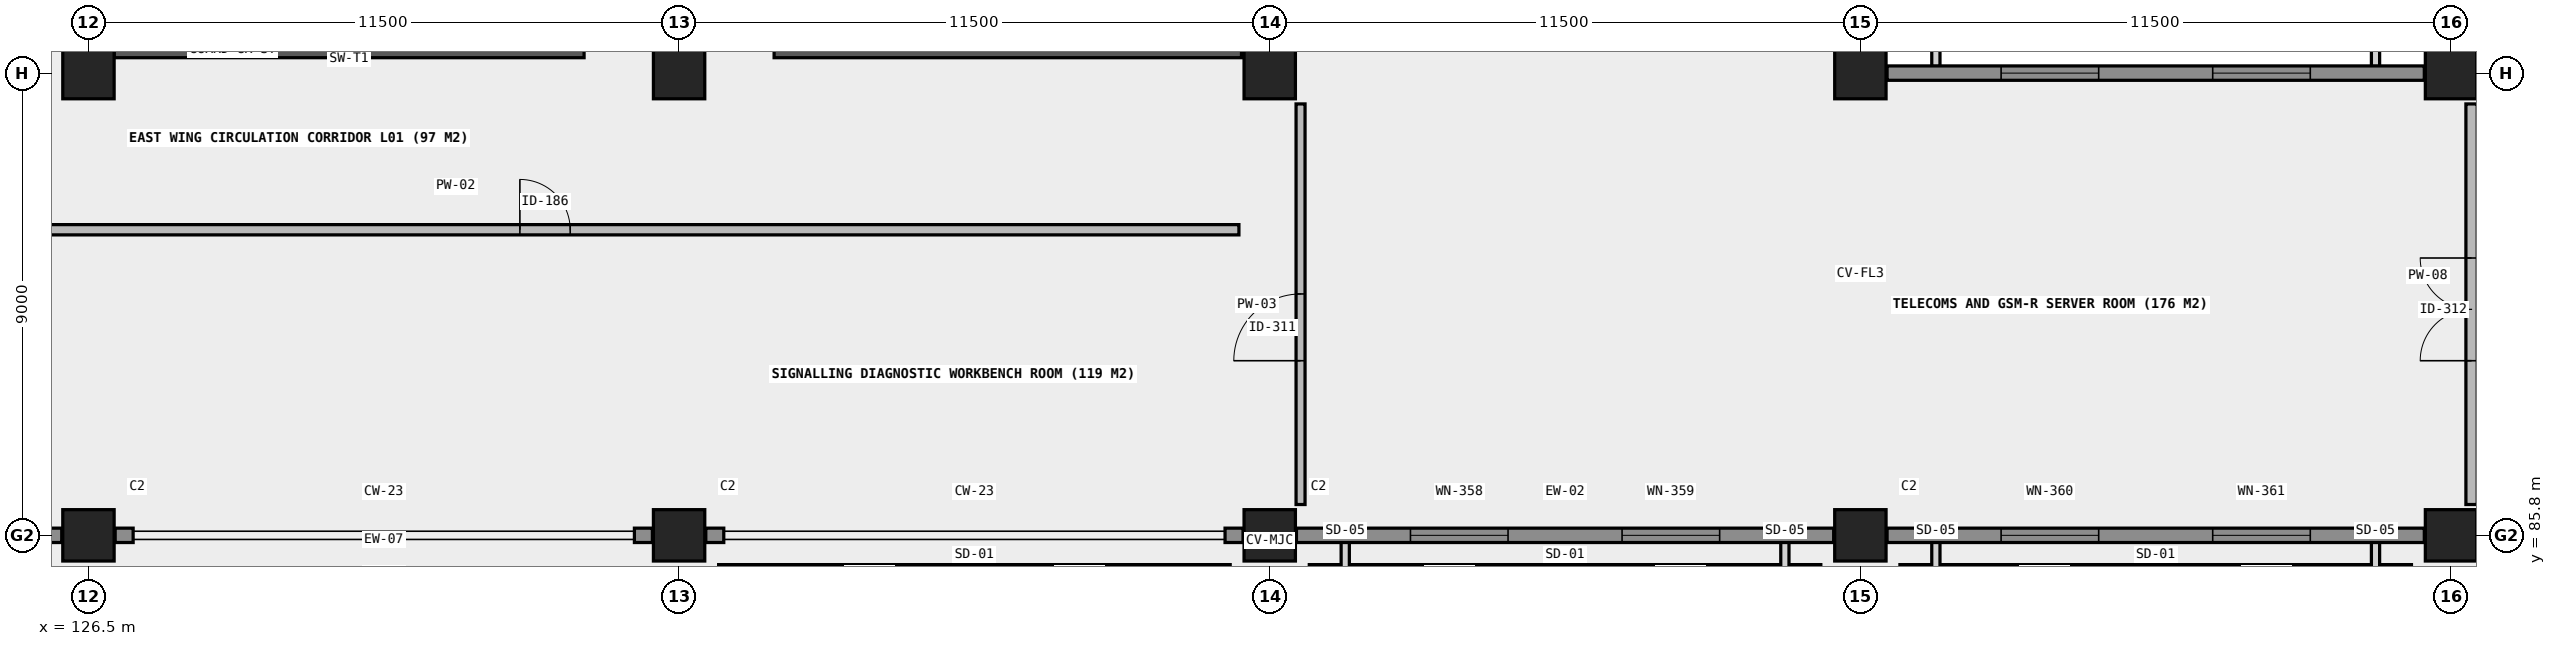
"""IFC4 building model, lengths in metres.
Left out: names, types, materials, properties, quantities, classifications, styles, units other than length and angle.
Written with IfcOpenShell. Run it as: python <this file> out.ifc"""

import sys

from ifc_helpers import new_model, si_unit, direction, frame, frame_2d, origin, origin_2d, place, context, subcontext, project, spatial, rectangle, extrude, element, fill, save


model = new_model("IFC4")
c1 = context("Model", 3, precision=1e-05, world=origin(), true_north=direction((0.0, 1.0)))
c2 = subcontext(c1, "Body", "Model", "MODEL_VIEW")
j1 = project(units=[si_unit("LENGTHUNIT", "METRE"), si_unit("PLANEANGLEUNIT", "RADIAN")], contexts=[c1])
p1 = place(None, origin())
s1 = spatial("IfcSite", under=j1, at=p1, CompositionType="ELEMENT")
p2 = place(p1, origin())
s2 = spatial("IfcBuilding", under=s1, at=p2, CompositionType="ELEMENT")
p3 = place(p2, frame((0.0, 0.0, 4.2)))
s3 = spatial("IfcBuildingStorey", under=s2, at=p3, CompositionType="ELEMENT", Elevation=4.2)
for number, where, z_axis, x_axis in (
    (1, (126.5, 85.8, 0.0), (0.0, 0.0, 1.0), (1.0, 0.0, 0.0)),
    (2, (126.5, 94.8, 0.0), (0.0, 0.0, 1.0), (1.0, 0.0, 0.0)),
    (3, (138.0, 85.8, 0.0), (0.0, 0.0, 1.0), (1.0, 0.0, 0.0)),
    (4, (138.0, 94.8, 0.0), (0.0, 0.0, 1.0), (1.0, 0.0, 0.0)),
    (5, (149.5, 85.8, 0.0), (0.0, 0.0, 1.0), (1.0, 0.0, 0.0)),
    (6, (149.5, 94.8, 0.0), (0.0, 0.0, 1.0), (1.0, 0.0, 0.0)),
    (7, (161.0, 85.8, 0.0), (0.0, 0.0, 1.0), (1.0, 0.0, 0.0)),
    (8, (161.0, 94.8, 0.0), (0.0, 0.0, 1.0), (1.0, 0.0, 0.0)),
    (9, (172.5, 85.8, 0.0), (0.0, 0.0, 1.0), (1.0, 0.0, 0.0)),
    (10, (172.5, 94.8, 0.0), (0.0, 0.0, 1.0), (1.0, 0.0, 0.0)),
):
    element("IfcColumn", number, at=place(p3, frame(where, z_axis=z_axis, x_axis=x_axis)), inside=s3, PredefinedType="COLUMN", context=c2, shape_type="SweptSolid", body=[
        extrude(rectangle(XDim=1.0, YDim=1.0, at=origin_2d()), origin(), (0.0, 0.0, 1.0), 4.2),
    ])
p4 = place(p3, frame((127.0, 95.325, 0.0), z_axis=(0.0, 0.0, 1.0), x_axis=(1.0, 0.0, 0.0)))
e11 = element("IfcWall", 11, at=p4, inside=s3, PredefinedType="SHEAR", context=c2, shape_type="SweptSolid", body=[
    extrude(rectangle(XDim=9.15, YDim=0.45, at=frame_2d((4.575, 0.0))), origin(), (0.0, 0.0, 1.0), 4.2),
])
p5 = place(p3, frame((139.85, 95.325, 0.0), z_axis=(0.0, 0.0, 1.0), x_axis=(1.0, 0.0, 0.0)))
e12 = element("IfcWall", 12, at=p5, inside=s3, PredefinedType="SHEAR", context=c2, shape_type="SweptSolid", body=[
    extrude(rectangle(XDim=9.1, YDim=0.45, at=frame_2d((4.55, 0.0))), origin(), (0.0, 0.0, 1.0), 4.2),
])
p6 = place(p3, frame((115.52, 85.8, 0.0), z_axis=(0.0, 0.0, 1.0), x_axis=(1.0, 0.0, 0.0)))
e13 = element("IfcWall", 13, at=p6, inside=s3, PredefinedType="SOLIDWALL", context=c2, shape_type="SweptSolid", body=[
    extrude(rectangle(XDim=10.46, YDim=0.28, at=frame_2d((5.23, 0.0))), origin(), (0.0, 0.0, 1.0), 3.15),
])
p7 = place(p6, frame((2.22, 0.0, 1.25)))
e14 = element("IfcOpeningElement", 14, at=p7, cuts=e13, PredefinedType="OPENING", context=c2, shape_type="SweptSolid", body=[
    extrude(rectangle(XDim=1.9, YDim=1.25, at=frame_2d((0.95, 0.625))), frame((0.0, 0.15, 0.0), z_axis=(0.0, -1.0, 0.0), x_axis=(1.0, 0.0, 0.0)), (0.0, 0.0, 1.0), 0.3),
])
p8 = place(p6, frame((6.34, 0.0, 1.25)))
e15 = element("IfcOpeningElement", 15, at=p8, cuts=e13, PredefinedType="OPENING", context=c2, shape_type="SweptSolid", body=[
    extrude(rectangle(XDim=1.9, YDim=1.25, at=frame_2d((0.95, 0.625))), frame((0.0, 0.15, 0.0), z_axis=(0.0, -1.0, 0.0), x_axis=(1.0, 0.0, 0.0)), (0.0, 0.0, 1.0), 0.3),
])
for number, where, z_axis, x_axis in (
    (16, (127.02, 85.8, 0.0), (0.0, 0.0, 1.0), (1.0, 0.0, 0.0)),
    (17, (137.13, 85.8, 0.0), (0.0, 0.0, 1.0), (1.0, 0.0, 0.0)),
    (18, (138.52, 85.8, 0.0), (0.0, 0.0, 1.0), (1.0, 0.0, 0.0)),
    (19, (148.63, 85.8, 0.0), (0.0, 0.0, 1.0), (1.0, 0.0, 0.0)),
):
    element("IfcWall", number, at=place(p3, frame(where, z_axis=z_axis, x_axis=x_axis)), inside=s3, PredefinedType="SOLIDWALL", context=c2, shape_type="SweptSolid", body=[
        extrude(rectangle(XDim=0.35, YDim=0.28, at=frame_2d((0.175, 0.0))), origin(), (0.0, 0.0, 1.0), 3.93),
    ])
p9 = place(p3, frame((150.02, 85.8, 0.0), z_axis=(0.0, 0.0, 1.0), x_axis=(1.0, 0.0, 0.0)))
e20 = element("IfcWall", 20, at=p9, inside=s3, PredefinedType="SOLIDWALL", context=c2, shape_type="SweptSolid", body=[
    extrude(rectangle(XDim=10.46, YDim=0.28, at=frame_2d((5.23, 0.0))), origin(), (0.0, 0.0, 1.0), 3.15),
])
p10 = place(p9, frame((2.22, 0.0, 1.25)))
e21 = element("IfcOpeningElement", 21, at=p10, cuts=e20, PredefinedType="OPENING", context=c2, shape_type="SweptSolid", body=[
    extrude(rectangle(XDim=1.9, YDim=1.25, at=frame_2d((0.95, 0.625))), frame((0.0, 0.15, 0.0), z_axis=(0.0, -1.0, 0.0), x_axis=(1.0, 0.0, 0.0)), (0.0, 0.0, 1.0), 0.3),
])
p11 = place(p9, frame((6.34, 0.0, 1.25)))
e22 = element("IfcOpeningElement", 22, at=p11, cuts=e20, PredefinedType="OPENING", context=c2, shape_type="SweptSolid", body=[
    extrude(rectangle(XDim=1.9, YDim=1.25, at=frame_2d((0.95, 0.625))), frame((0.0, 0.15, 0.0), z_axis=(0.0, -1.0, 0.0), x_axis=(1.0, 0.0, 0.0)), (0.0, 0.0, 1.0), 0.3),
])
p12 = place(p3, frame((161.52, 85.8, 0.0), z_axis=(0.0, 0.0, 1.0), x_axis=(1.0, 0.0, 0.0)))
e23 = element("IfcWall", 23, at=p12, inside=s3, PredefinedType="SOLIDWALL", context=c2, shape_type="SweptSolid", body=[
    extrude(rectangle(XDim=10.46, YDim=0.28, at=frame_2d((5.23, 0.0))), origin(), (0.0, 0.0, 1.0), 3.15),
])
p13 = place(p12, frame((2.22, 0.0, 1.25)))
e24 = element("IfcOpeningElement", 24, at=p13, cuts=e23, PredefinedType="OPENING", context=c2, shape_type="SweptSolid", body=[
    extrude(rectangle(XDim=1.9, YDim=1.25, at=frame_2d((0.95, 0.625))), frame((0.0, 0.15, 0.0), z_axis=(0.0, -1.0, 0.0), x_axis=(1.0, 0.0, 0.0)), (0.0, 0.0, 1.0), 0.3),
])
p14 = place(p12, frame((6.34, 0.0, 1.25)))
e25 = element("IfcOpeningElement", 25, at=p14, cuts=e23, PredefinedType="OPENING", context=c2, shape_type="SweptSolid", body=[
    extrude(rectangle(XDim=1.9, YDim=1.25, at=frame_2d((0.95, 0.625))), frame((0.0, 0.15, 0.0), z_axis=(0.0, -1.0, 0.0), x_axis=(1.0, 0.0, 0.0)), (0.0, 0.0, 1.0), 0.3),
])
p15 = place(p3, frame((161.52, 94.8, 0.0), z_axis=(0.0, 0.0, 1.0), x_axis=(1.0, 0.0, 0.0)))
e26 = element("IfcWall", 26, at=p15, inside=s3, PredefinedType="SOLIDWALL", context=c2, shape_type="SweptSolid", body=[
    extrude(rectangle(XDim=10.46, YDim=0.28, at=frame_2d((5.23, 0.0))), origin(), (0.0, 0.0, 1.0), 3.15),
])
p16 = place(p15, frame((2.22, 0.0, 1.25)))
e27 = element("IfcOpeningElement", 27, at=p16, cuts=e26, PredefinedType="OPENING", context=c2, shape_type="SweptSolid", body=[
    extrude(rectangle(XDim=1.9, YDim=1.25, at=frame_2d((0.95, 0.625))), frame((0.0, 0.15, 0.0), z_axis=(0.0, -1.0, 0.0), x_axis=(1.0, 0.0, 0.0)), (0.0, 0.0, 1.0), 0.3),
])
p17 = place(p15, frame((6.34, 0.0, 1.25)))
e28 = element("IfcOpeningElement", 28, at=p17, cuts=e26, PredefinedType="OPENING", context=c2, shape_type="SweptSolid", body=[
    extrude(rectangle(XDim=1.9, YDim=1.25, at=frame_2d((0.95, 0.625))), frame((0.0, 0.15, 0.0), z_axis=(0.0, -1.0, 0.0), x_axis=(1.0, 0.0, 0.0)), (0.0, 0.0, 1.0), 0.3),
])
p18 = place(p3, frame((118.4, 91.75, 0.0), z_axis=(0.0, 0.0, 1.0), x_axis=(1.0, 0.0, 0.0)))
e29 = element("IfcWall", 29, at=p18, inside=s3, PredefinedType="PARTITIONING", context=c2, shape_type="SweptSolid", body=[
    extrude(rectangle(XDim=30.5, YDim=0.2, at=frame_2d((15.25, 0.0))), origin(), (0.0, 0.0, 1.0), 3.84),
])
p19 = place(p18, frame((4.2, 0.0, 0.0)))
e30 = element("IfcOpeningElement", 30, at=p19, cuts=e29, PredefinedType="OPENING", context=c2, shape_type="SweptSolid", body=[
    extrude(rectangle(XDim=1.8, YDim=2.2, at=frame_2d((0.9, 1.1))), frame((0.0, 0.11, 0.0), z_axis=(0.0, -1.0, 0.0), x_axis=(1.0, 0.0, 0.0)), (0.0, 0.0, 1.0), 0.22),
])
p20 = place(p18, frame((16.5, 0.0, 0.0)))
e31 = element("IfcOpeningElement", 31, at=p20, cuts=e29, PredefinedType="OPENING", context=c2, shape_type="SweptSolid", body=[
    extrude(rectangle(XDim=0.98, YDim=2.15, at=frame_2d((0.49, 1.075))), frame((0.0, 0.11, 0.0), z_axis=(0.0, -1.0, 0.0), x_axis=(1.0, 0.0, 0.0)), (0.0, 0.0, 1.0), 0.22),
])
p21 = place(p3, frame((150.1, 86.4, 0.0), z_axis=(0.0, 0.0, 1.0), x_axis=(0.0, 1.0, 0.0)))
e32 = element("IfcWall", 32, at=p21, inside=s3, PredefinedType="PARTITIONING", context=c2, shape_type="SweptSolid", body=[
    extrude(rectangle(XDim=7.8, YDim=0.175, at=frame_2d((3.9, 0.0))), origin(), (0.0, 0.0, 1.0), 3.84),
])
p22 = place(p21, frame((2.8, 0.0, 0.0)))
e33 = element("IfcOpeningElement", 33, at=p22, cuts=e32, PredefinedType="OPENING", context=c2, shape_type="SweptSolid", body=[
    extrude(rectangle(XDim=1.3, YDim=2.2, at=frame_2d((0.65, 1.1))), frame((0.0, 0.098, 0.0), z_axis=(0.0, -1.0, 0.0), x_axis=(1.0, 0.0, 0.0)), (0.0, 0.0, 1.0), 0.195),
])
p23 = place(p3, frame((172.9, 86.4, 0.0), z_axis=(0.0, 0.0, 1.0), x_axis=(0.0, 1.0, 0.0)))
e34 = element("IfcWall", 34, at=p23, inside=s3, PredefinedType="SOLIDWALL", context=c2, shape_type="SweptSolid", body=[
    extrude(rectangle(XDim=7.8, YDim=0.22, at=frame_2d((3.9, 0.0))), origin(), (0.0, 0.0, 1.0), 3.84),
])
p24 = place(p23, frame((2.8, 0.0, 0.0)))
e35 = element("IfcOpeningElement", 35, at=p24, cuts=e34, PredefinedType="OPENING", context=c2, shape_type="SweptSolid", body=[
    extrude(rectangle(XDim=2.0, YDim=2.3, at=frame_2d((1.0, 1.15))), frame((0.0, 0.12, 0.0), z_axis=(0.0, -1.0, 0.0), x_axis=(1.0, 0.0, 0.0)), (0.0, 0.0, 1.0), 0.24),
])
p25 = place(p10, origin())
e36 = element("IfcWindow", 36, at=p25, inside=s3, PartitioningType="SINGLE_PANEL", PredefinedType="WINDOW", context=c2, shape_type="SweptSolid", body=[
    extrude(rectangle(XDim=1.9, YDim=1.25, at=frame_2d((0.95, 0.625))), frame((0.0, 0.03, 0.0), z_axis=(0.0, -1.0, 0.0), x_axis=(1.0, 0.0, 0.0)), (0.0, 0.0, 1.0), 0.06),
])
fill(e21, e36)
p26 = place(p11, origin())
e37 = element("IfcWindow", 37, at=p26, inside=s3, PartitioningType="SINGLE_PANEL", PredefinedType="WINDOW", context=c2, shape_type="SweptSolid", body=[
    extrude(rectangle(XDim=1.9, YDim=1.25, at=frame_2d((0.95, 0.625))), frame((0.0, 0.03, 0.0), z_axis=(0.0, -1.0, 0.0), x_axis=(1.0, 0.0, 0.0)), (0.0, 0.0, 1.0), 0.06),
])
fill(e22, e37)
p27 = place(p13, origin())
e38 = element("IfcWindow", 38, at=p27, inside=s3, PartitioningType="SINGLE_PANEL", PredefinedType="WINDOW", context=c2, shape_type="SweptSolid", body=[
    extrude(rectangle(XDim=1.9, YDim=1.25, at=frame_2d((0.95, 0.625))), frame((0.0, 0.03, 0.0), z_axis=(0.0, -1.0, 0.0), x_axis=(1.0, 0.0, 0.0)), (0.0, 0.0, 1.0), 0.06),
])
fill(e24, e38)
p28 = place(p14, origin())
e39 = element("IfcWindow", 39, at=p28, inside=s3, PartitioningType="SINGLE_PANEL", PredefinedType="WINDOW", context=c2, shape_type="SweptSolid", body=[
    extrude(rectangle(XDim=1.9, YDim=1.25, at=frame_2d((0.95, 0.625))), frame((0.0, 0.03, 0.0), z_axis=(0.0, -1.0, 0.0), x_axis=(1.0, 0.0, 0.0)), (0.0, 0.0, 1.0), 0.06),
])
fill(e25, e39)
p29 = place(p16, origin())
e40 = element("IfcWindow", 40, at=p29, inside=s3, PartitioningType="SINGLE_PANEL", PredefinedType="WINDOW", context=c2, shape_type="SweptSolid", body=[
    extrude(rectangle(XDim=1.9, YDim=1.25, at=frame_2d((0.95, 0.625))), frame((0.0, 0.03, 0.0), z_axis=(0.0, -1.0, 0.0), x_axis=(1.0, 0.0, 0.0)), (0.0, 0.0, 1.0), 0.06),
])
fill(e27, e40)
p30 = place(p17, origin())
e41 = element("IfcWindow", 41, at=p30, inside=s3, PartitioningType="SINGLE_PANEL", PredefinedType="WINDOW", context=c2, shape_type="SweptSolid", body=[
    extrude(rectangle(XDim=1.9, YDim=1.25, at=frame_2d((0.95, 0.625))), frame((0.0, 0.03, 0.0), z_axis=(0.0, -1.0, 0.0), x_axis=(1.0, 0.0, 0.0)), (0.0, 0.0, 1.0), 0.06),
])
fill(e28, e41)
p31 = place(p20, origin())
e42 = element("IfcDoor", 42, at=p31, inside=s3, OperationType="SINGLE_SWING_LEFT", PredefinedType="DOOR", context=c2, shape_type="SweptSolid", body=[
    extrude(rectangle(XDim=0.98, YDim=2.15, at=frame_2d((0.49, 1.075))), frame((0.0, 0.025, 0.0), z_axis=(0.0, -1.0, 0.0), x_axis=(1.0, 0.0, 0.0)), (0.0, 0.0, 1.0), 0.05),
])
fill(e31, e42)
p32 = place(p22, origin())
e43 = element("IfcDoor", 43, at=p32, inside=s3, OperationType="SINGLE_SWING_LEFT", PredefinedType="DOOR", context=c2, shape_type="SweptSolid", body=[
    extrude(rectangle(XDim=1.3, YDim=2.2, at=frame_2d((0.65, 1.1))), frame((0.0, 0.025, 0.0), z_axis=(0.0, -1.0, 0.0), x_axis=(1.0, 0.0, 0.0)), (0.0, 0.0, 1.0), 0.05),
])
fill(e33, e43)
p33 = place(p24, origin())
e44 = element("IfcDoor", 44, at=p33, inside=s3, OperationType="DOUBLE_DOOR_SINGLE_SWING", PredefinedType="DOOR", context=c2, shape_type="SweptSolid", body=[
    extrude(rectangle(XDim=2.0, YDim=2.3, at=frame_2d((1.0, 1.15))), frame((0.0, 0.025, 0.0), z_axis=(0.0, -1.0, 0.0), x_axis=(1.0, 0.0, 0.0)), (0.0, 0.0, 1.0), 0.05),
])
fill(e35, e44)
save(model, sys.argv[1])
